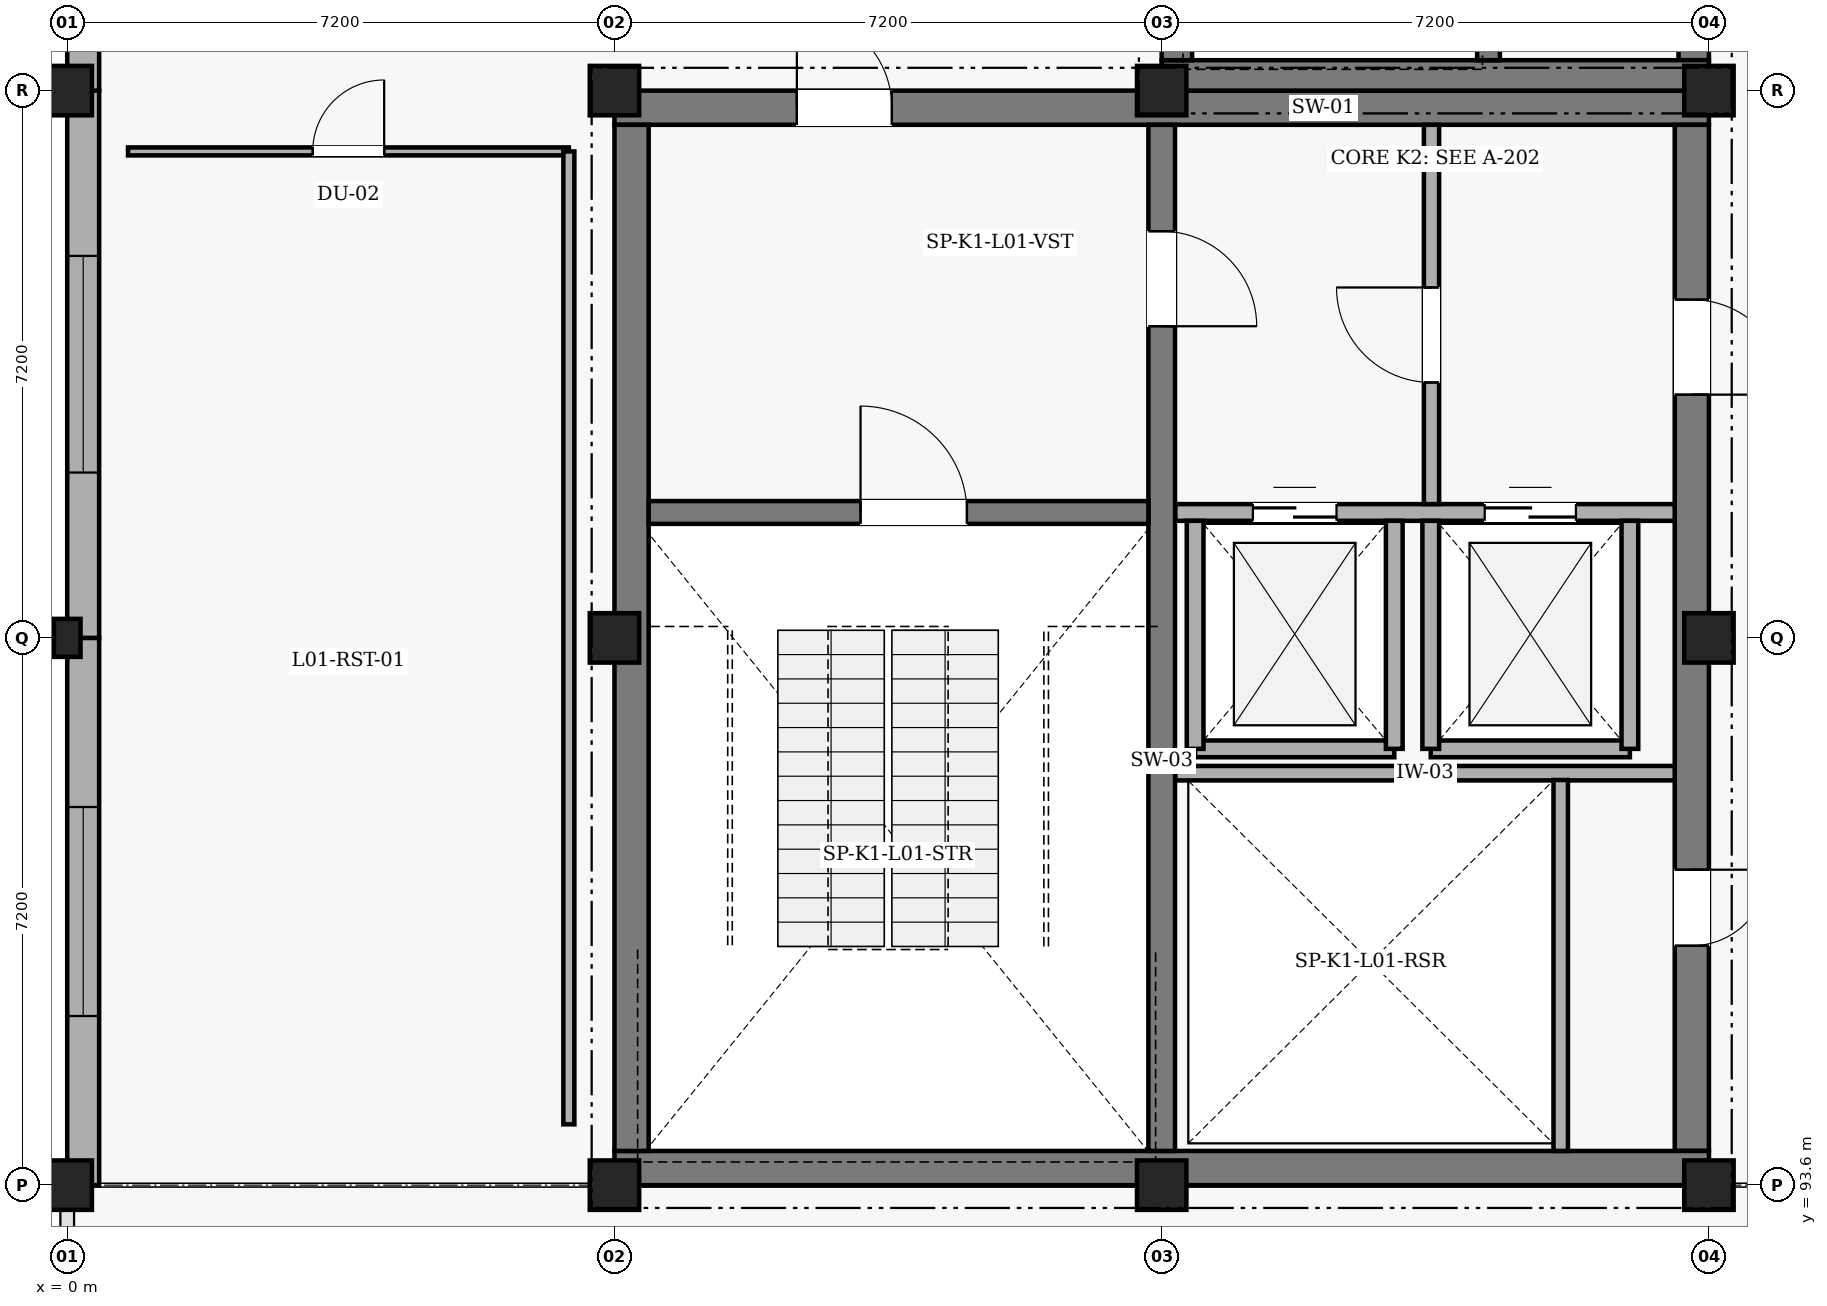
"""IFC4 building model, lengths in metres.
Left out: names, types, materials, properties, quantities, classifications, styles, units other than length and angle.
Written with IfcOpenShell. Run it as: python <this file> out.ifc"""

import sys

from ifc_helpers import new_model, si_unit, direction, frame, frame_2d, origin, origin_2d, place, context, subcontext, project, spatial, rectangle, extrude, element, fill, save


model = new_model("IFC4")
c1 = context("Model", 3, precision=1e-05, world=origin(), true_north=direction((0.0, 1.0)))
c2 = subcontext(c1, "Body", "Model", "MODEL_VIEW")
j1 = project(units=[si_unit("LENGTHUNIT", "METRE"), si_unit("PLANEANGLEUNIT", "RADIAN")], contexts=[c1])
p1 = place(None, origin())
s1 = spatial("IfcSite", under=j1, at=p1, CompositionType="ELEMENT")
p2 = place(p1, origin())
s2 = spatial("IfcBuilding", under=s1, at=p2, CompositionType="ELEMENT")
p3 = place(p2, frame((0.0, 0.0, 5.4)))
s3 = spatial("IfcBuildingStorey", under=s2, at=p3, CompositionType="ELEMENT", Elevation=5.4)
p4 = place(p3, frame((7.2, 107.775, 0.0), z_axis=(0.0, 0.0, 1.0), x_axis=(1.0, 0.0, 0.0)))
e1 = element("IfcWall", 1, at=p4, inside=s3, PredefinedType="SHEAR", context=c2, shape_type="SweptSolid", body=[
    extrude(rectangle(XDim=14.4, YDim=0.45, at=frame_2d((7.2, 0.0))), origin(), (0.0, 0.0, 1.0), 4.2),
])
p5 = place(p4, frame((2.4, 0.0, 0.0)))
e2 = element("IfcOpeningElement", 2, at=p5, cuts=e1, PredefinedType="OPENING", context=c2, shape_type="SweptSolid", body=[
    extrude(rectangle(XDim=1.25, YDim=2.2, at=frame_2d((0.625, 1.1))), frame((0.0, 0.235, 0.0), z_axis=(0.0, -1.0, 0.0), x_axis=(1.0, 0.0, 0.0)), (0.0, 0.0, 1.0), 0.47),
])
p6 = place(p3, frame((21.375, 107.55, 0.0), z_axis=(0.0, 0.0, 1.0), x_axis=(0.0, -1.0, 0.0)))
e3 = element("IfcWall", 3, at=p6, inside=s3, PredefinedType="SHEAR", context=c2, shape_type="SweptSolid", body=[
    extrude(rectangle(XDim=13.5, YDim=0.45, at=frame_2d((6.75, 0.0))), origin(), (0.0, 0.0, 1.0), 4.2),
])
p7 = place(p6, frame((9.8, 0.0, 0.0)))
e4 = element("IfcOpeningElement", 4, at=p7, cuts=e3, PredefinedType="OPENING", context=c2, shape_type="SweptSolid", body=[
    extrude(rectangle(XDim=1.0, YDim=2.15, at=frame_2d((0.5, 1.075))), frame((0.0, 0.235, 0.0), z_axis=(0.0, -1.0, 0.0), x_axis=(1.0, 0.0, 0.0)), (0.0, 0.0, 1.0), 0.47),
])
p8 = place(p6, frame((2.3, 0.0, 0.0)))
e5 = element("IfcOpeningElement", 5, at=p8, cuts=e3, PredefinedType="OPENING", context=c2, shape_type="SweptSolid", body=[
    extrude(rectangle(XDim=1.25, YDim=2.2, at=frame_2d((0.625, 1.1))), frame((0.0, 0.235, 0.0), z_axis=(0.0, -1.0, 0.0), x_axis=(1.0, 0.0, 0.0)), (0.0, 0.0, 1.0), 0.47),
])
p9 = place(p3, frame((21.6, 93.825, 0.0), z_axis=(0.0, 0.0, 1.0), x_axis=(-1.0, 0.0, 0.0)))
e6 = element("IfcWall", 6, at=p9, inside=s3, PredefinedType="SHEAR", context=c2, shape_type="SweptSolid", body=[
    extrude(rectangle(XDim=14.4, YDim=0.45, at=frame_2d((7.2, 0.0))), origin(), (0.0, 0.0, 1.0), 4.2),
])
p10 = place(p3, frame((7.425, 94.05, 0.0), z_axis=(0.0, 0.0, 1.0), x_axis=(0.0, 1.0, 0.0)))
e7 = element("IfcWall", 7, at=p10, inside=s3, PredefinedType="SHEAR", context=c2, shape_type="SweptSolid", body=[
    extrude(rectangle(XDim=13.5, YDim=0.45, at=frame_2d((6.75, 0.0))), origin(), (0.0, 0.0, 1.0), 4.2),
])
p11 = place(p3, frame((14.4, 107.55, 0.0), z_axis=(0.0, 0.0, 1.0), x_axis=(0.0, -1.0, 0.0)))
e8 = element("IfcWall", 8, at=p11, inside=s3, PredefinedType="SHEAR", context=c2, shape_type="SweptSolid", body=[
    extrude(rectangle(XDim=13.5, YDim=0.35, at=frame_2d((6.75, 0.0))), origin(), (0.0, 0.0, 1.0), 4.2),
])
p12 = place(p11, frame((1.4, 0.0, 0.0)))
e9 = element("IfcOpeningElement", 9, at=p12, cuts=e8, PredefinedType="OPENING", context=c2, shape_type="SweptSolid", body=[
    extrude(rectangle(XDim=1.25, YDim=2.2, at=frame_2d((0.625, 1.1))), frame((0.0, 0.185, 0.0), z_axis=(0.0, -1.0, 0.0), x_axis=(1.0, 0.0, 0.0)), (0.0, 0.0, 1.0), 0.37),
])
p13 = place(p3, frame((7.65, 102.45, 0.0), z_axis=(0.0, 0.0, 1.0), x_axis=(1.0, 0.0, 0.0)))
e10 = element("IfcWall", 10, at=p13, inside=s3, PredefinedType="SHEAR", context=c2, shape_type="SweptSolid", body=[
    extrude(rectangle(XDim=6.575, YDim=0.3, at=frame_2d((3.288, 0.0))), origin(), (0.0, 0.0, 1.0), 4.2),
])
p14 = place(p13, frame((2.788, 0.0, 0.0)))
e11 = element("IfcOpeningElement", 11, at=p14, cuts=e10, PredefinedType="OPENING", context=c2, shape_type="SweptSolid", body=[
    extrude(rectangle(XDim=1.4, YDim=2.2, at=frame_2d((0.7, 1.1))), frame((0.0, 0.16, 0.0), z_axis=(0.0, -1.0, 0.0), x_axis=(1.0, 0.0, 0.0)), (0.0, 0.0, 1.0), 0.32),
])
p15 = place(p3, frame((21.4, 122.0, 0.0), z_axis=(0.0, 0.0, 1.0), x_axis=(0.0, -1.0, 0.0)))
e12 = element("IfcWall", 12, at=p15, inside=s3, PredefinedType="SHEAR", context=c2, shape_type="SweptSolid", body=[
    extrude(rectangle(XDim=13.6, YDim=0.4, at=frame_2d((6.8, 0.0))), origin(), (0.0, 0.0, 1.0), 4.2),
])
p16 = place(p15, frame((2.3, 0.0, 0.0)))
e13 = element("IfcOpeningElement", 13, at=p16, cuts=e12, PredefinedType="OPENING", context=c2, shape_type="SweptSolid", body=[
    extrude(rectangle(XDim=1.25, YDim=2.2, at=frame_2d((0.625, 1.1))), frame((0.0, 0.21, 0.0), z_axis=(0.0, -1.0, 0.0), x_axis=(1.0, 0.0, 0.0)), (0.0, 0.0, 1.0), 0.42),
])
p17 = place(p3, frame((21.6, 108.2, 0.0), z_axis=(0.0, 0.0, 1.0), x_axis=(-1.0, 0.0, 0.0)))
e14 = element("IfcWall", 14, at=p17, inside=s3, PredefinedType="SHEAR", context=c2, shape_type="SweptSolid", body=[
    extrude(rectangle(XDim=7.2, YDim=0.4, at=frame_2d((3.6, 0.0))), origin(), (0.0, 0.0, 1.0), 4.2),
])
p18 = place(p3, frame((14.6, 108.4, 0.0), z_axis=(0.0, 0.0, 1.0), x_axis=(0.0, 1.0, 0.0)))
e15 = element("IfcWall", 15, at=p18, inside=s3, PredefinedType="SHEAR", context=c2, shape_type="SweptSolid", body=[
    extrude(rectangle(XDim=13.6, YDim=0.4, at=frame_2d((6.8, 0.0))), origin(), (0.0, 0.0, 1.0), 4.2),
])
p19 = place(p18, frame((9.8, 0.0, 0.0)))
e16 = element("IfcOpeningElement", 16, at=p19, cuts=e15, PredefinedType="OPENING", context=c2, shape_type="SweptSolid", body=[
    extrude(rectangle(XDim=1.25, YDim=2.2, at=frame_2d((0.625, 1.1))), frame((0.0, 0.21, 0.0), z_axis=(0.0, -1.0, 0.0), x_axis=(1.0, 0.0, 0.0)), (0.0, 0.0, 1.0), 0.42),
])
p20 = place(p3, frame((18.7, 116.7, 0.0), z_axis=(0.0, 0.0, 1.0), x_axis=(0.0, -1.0, 0.0)))
e17 = element("IfcWall", 17, at=p20, inside=s3, PredefinedType="SHEAR", context=c2, shape_type="SweptSolid", body=[
    extrude(rectangle(XDim=8.3, YDim=0.3, at=frame_2d((4.15, 0.0))), origin(), (0.0, 0.0, 1.0), 4.2),
])
p21 = place(p3, frame((0.0, 93.6, 0.0), z_axis=(0.0, 0.0, 1.0), x_axis=(0.0, 1.0, 0.0)))
e18 = element("IfcColumn", 18, at=p21, inside=s3, PredefinedType="COLUMN", context=c2, shape_type="SweptSolid", body=[
    extrude(rectangle(XDim=0.65, YDim=0.65, at=origin_2d()), origin(), (0.0, 0.0, 1.0), 3.88),
])
p22 = place(p3, frame((0.0, 100.8, 0.0), z_axis=(0.0, 0.0, 1.0), x_axis=(1.0, 0.0, 0.0)))
e19 = element("IfcColumn", 19, at=p22, inside=s3, PredefinedType="PILASTER", context=c2, shape_type="SweptSolid", body=[
    extrude(rectangle(XDim=0.35, YDim=0.5, at=origin_2d()), origin(), (0.0, 0.0, 1.0), 3.88),
])
for number, where, z_axis, x_axis in (
    (20, (0.0, 108.0, 0.0), (0.0, 0.0, 1.0), (1.0, 0.0, 0.0)),
    (21, (7.2, 93.6, 0.0), (0.0, 0.0, 1.0), (1.0, 0.0, 0.0)),
    (22, (7.2, 100.8, 0.0), (0.0, 0.0, 1.0), (1.0, 0.0, 0.0)),
    (23, (7.2, 108.0, 0.0), (0.0, 0.0, 1.0), (1.0, 0.0, 0.0)),
    (24, (14.4, 93.6, 0.0), (0.0, 0.0, 1.0), (1.0, 0.0, 0.0)),
    (25, (14.4, 108.0, 0.0), (0.0, 0.0, 1.0), (1.0, 0.0, 0.0)),
    (26, (21.6, 93.6, 0.0), (0.0, 0.0, 1.0), (1.0, 0.0, 0.0)),
    (27, (21.6, 100.8, 0.0), (0.0, 0.0, 1.0), (1.0, 0.0, 0.0)),
    (28, (21.6, 108.0, 0.0), (0.0, 0.0, 1.0), (1.0, 0.0, 0.0)),
):
    element("IfcColumn", number, at=place(p3, frame(where, z_axis=z_axis, x_axis=x_axis)), inside=s3, PredefinedType="COLUMN", context=c2, shape_type="SweptSolid", body=[
        extrude(rectangle(XDim=0.65, YDim=0.65, at=origin_2d()), origin(), (0.0, 0.0, 1.0), 3.88),
    ])
p23 = place(p3, frame((0.21, 93.6, 0.0), z_axis=(0.0, 0.0, 1.0), x_axis=(0.0, 1.0, 0.0)))
e29 = element("IfcWall", 29, at=p23, inside=s3, PredefinedType="SOLIDWALL", context=c2, shape_type="SweptSolid", body=[
    extrude(rectangle(XDim=7.2, YDim=0.42, at=frame_2d((3.6, 0.0))), origin(), (0.0, 0.0, 1.0), 3.55),
])
p24 = place(p23, frame((2.225, 0.0, 0.9)))
e30 = element("IfcOpeningElement", 30, at=p24, cuts=e29, PredefinedType="OPENING", context=c2, shape_type="SweptSolid", body=[
    extrude(rectangle(XDim=2.75, YDim=1.75, at=frame_2d((1.375, 0.875))), frame((0.0, 0.22, 0.0), z_axis=(0.0, -1.0, 0.0), x_axis=(1.0, 0.0, 0.0)), (0.0, 0.0, 1.0), 0.44),
])
p25 = place(p3, frame((0.21, 100.8, 0.0), z_axis=(0.0, 0.0, 1.0), x_axis=(0.0, 1.0, 0.0)))
e31 = element("IfcWall", 31, at=p25, inside=s3, PredefinedType="SOLIDWALL", context=c2, shape_type="SweptSolid", body=[
    extrude(rectangle(XDim=7.2, YDim=0.42, at=frame_2d((3.6, 0.0))), origin(), (0.0, 0.0, 1.0), 3.55),
])
p26 = place(p25, frame((2.175, 0.0, 0.9)))
e32 = element("IfcOpeningElement", 32, at=p26, cuts=e31, PredefinedType="OPENING", context=c2, shape_type="SweptSolid", body=[
    extrude(rectangle(XDim=2.85, YDim=1.55, at=frame_2d((1.425, 0.775))), frame((0.0, 0.22, 0.0), z_axis=(0.0, -1.0, 0.0), x_axis=(1.0, 0.0, 0.0)), (0.0, 0.0, 1.0), 0.44),
])
p27 = place(p3, frame((0.21, 108.0, 0.0), z_axis=(0.0, 0.0, 1.0), x_axis=(0.0, 1.0, 0.0)))
e33 = element("IfcWall", 33, at=p27, inside=s3, PredefinedType="SOLIDWALL", context=c2, shape_type="SweptSolid", body=[
    extrude(rectangle(XDim=7.2, YDim=0.42, at=frame_2d((3.6, 0.0))), origin(), (0.0, 0.0, 1.0), 3.55),
])
p28 = place(p27, frame((2.125, 0.0, 0.9)))
e34 = element("IfcOpeningElement", 34, at=p28, cuts=e33, PredefinedType="OPENING", context=c2, shape_type="SweptSolid", body=[
    extrude(rectangle(XDim=2.95, YDim=1.6, at=frame_2d((1.475, 0.8))), frame((0.0, 0.22, 0.0), z_axis=(0.0, -1.0, 0.0), x_axis=(1.0, 0.0, 0.0)), (0.0, 0.0, 1.0), 0.44),
])
p29 = place(p3, frame((14.58, 99.02, 0.0), z_axis=(0.0, 0.0, 1.0), x_axis=(1.0, 0.0, 0.0)))
e35 = element("IfcWall", 35, at=p29, inside=s3, PredefinedType="PARTITIONING", context=c2, shape_type="SweptSolid", body=[
    extrude(rectangle(XDim=6.57, YDim=0.19, at=frame_2d((3.285, 0.0))), origin(), (0.0, 0.0, 1.0), 3.85),
])
p30 = place(p3, frame((19.65, 94.05, 0.0), z_axis=(0.0, 0.0, 1.0), x_axis=(0.0, 1.0, 0.0)))
e36 = element("IfcWall", 36, at=p30, inside=s3, PredefinedType="PARTITIONING", context=c2, shape_type="SweptSolid", body=[
    extrude(rectangle(XDim=4.88, YDim=0.19, at=frame_2d((2.44, 0.0))), origin(), (0.0, 0.0, 1.0), 3.85),
])
p31 = place(p3, frame((14.58, 102.45, 0.0), z_axis=(0.0, 0.0, 1.0), x_axis=(1.0, 0.0, 0.0)))
e37 = element("IfcWall", 37, at=p31, inside=s3, PredefinedType="PARTITIONING", context=c2, shape_type="SweptSolid", body=[
    extrude(rectangle(XDim=6.57, YDim=0.22, at=frame_2d((3.285, 0.0))), origin(), (0.0, 0.0, 1.0), 3.85),
])
p32 = place(p31, frame((1.02, 0.0, 0.0)))
e38 = element("IfcOpeningElement", 38, at=p32, cuts=e37, PredefinedType="OPENING", context=c2, shape_type="SweptSolid", body=[
    extrude(rectangle(XDim=1.1, YDim=2.15, at=frame_2d((0.55, 1.075))), frame((0.0, 0.12, 0.0), z_axis=(0.0, -1.0, 0.0), x_axis=(1.0, 0.0, 0.0)), (0.0, 0.0, 1.0), 0.24),
])
p33 = place(p31, frame((4.07, 0.0, 0.0)))
e39 = element("IfcOpeningElement", 39, at=p33, cuts=e37, PredefinedType="OPENING", context=c2, shape_type="SweptSolid", body=[
    extrude(rectangle(XDim=1.2, YDim=2.15, at=frame_2d((0.6, 1.075))), frame((0.0, 0.12, 0.0), z_axis=(0.0, -1.0, 0.0), x_axis=(1.0, 0.0, 0.0)), (0.0, 0.0, 1.0), 0.24),
])
p34 = place(p3, frame((14.84, 99.34, 0.0), z_axis=(0.0, 0.0, 1.0), x_axis=(1.0, 0.0, 0.0)))
e40 = element("IfcWall", 40, at=p34, inside=s3, PredefinedType="PARTITIONING", context=c2, shape_type="SweptSolid", body=[
    extrude(rectangle(XDim=2.62, YDim=0.22, at=frame_2d((1.31, 0.0))), origin(), (0.0, 0.0, 1.0), 3.85),
])
for number, where, z_axis, x_axis in (
    (41, (14.84, 99.34, 0.0), (0.0, 0.0, 1.0), (0.0, 1.0, 0.0)),
    (42, (17.46, 99.34, 0.0), (0.0, 0.0, 1.0), (0.0, 1.0, 0.0)),
):
    element("IfcWall", number, at=place(p3, frame(where, z_axis=z_axis, x_axis=x_axis)), inside=s3, PredefinedType="PARTITIONING", context=c2, shape_type="SweptSolid", body=[
        extrude(rectangle(XDim=3.0, YDim=0.22, at=frame_2d((1.5, 0.0))), origin(), (0.0, 0.0, 1.0), 3.85),
    ])
p35 = place(p3, frame((17.94, 99.34, 0.0), z_axis=(0.0, 0.0, 1.0), x_axis=(1.0, 0.0, 0.0)))
e43 = element("IfcWall", 43, at=p35, inside=s3, PredefinedType="PARTITIONING", context=c2, shape_type="SweptSolid", body=[
    extrude(rectangle(XDim=2.62, YDim=0.22, at=frame_2d((1.31, 0.0))), origin(), (0.0, 0.0, 1.0), 3.85),
])
for number, where, z_axis, x_axis in (
    (44, (17.94, 99.34, 0.0), (0.0, 0.0, 1.0), (0.0, 1.0, 0.0)),
    (45, (20.56, 99.34, 0.0), (0.0, 0.0, 1.0), (0.0, 1.0, 0.0)),
):
    element("IfcWall", number, at=place(p3, frame(where, z_axis=z_axis, x_axis=x_axis)), inside=s3, PredefinedType="PARTITIONING", context=c2, shape_type="SweptSolid", body=[
        extrude(rectangle(XDim=3.0, YDim=0.22, at=frame_2d((1.5, 0.0))), origin(), (0.0, 0.0, 1.0), 3.85),
    ])
p36 = place(p3, frame((17.95, 102.56, 0.0), z_axis=(0.0, 0.0, 1.0), x_axis=(0.0, 1.0, 0.0)))
e46 = element("IfcWall", 46, at=p36, inside=s3, PredefinedType="PARTITIONING", context=c2, shape_type="SweptSolid", body=[
    extrude(rectangle(XDim=4.99, YDim=0.2, at=frame_2d((2.495, 0.0))), origin(), (0.0, 0.0, 1.0), 3.85),
])
p37 = place(p36, frame((1.6, 0.0, 0.0)))
e47 = element("IfcOpeningElement", 47, at=p37, cuts=e46, PredefinedType="OPENING", context=c2, shape_type="SweptSolid", body=[
    extrude(rectangle(XDim=1.25, YDim=2.2, at=frame_2d((0.625, 1.1))), frame((0.0, 0.11, 0.0), z_axis=(0.0, -1.0, 0.0), x_axis=(1.0, 0.0, 0.0)), (0.0, 0.0, 1.0), 0.22),
])
p38 = place(p3, frame((0.8, 107.2, 0.0), z_axis=(0.0, 0.0, 1.0), x_axis=(1.0, 0.0, 0.0)))
e48 = element("IfcWall", 48, at=p38, inside=s3, PredefinedType="PARTITIONING", context=c2, shape_type="SweptSolid", body=[
    extrude(rectangle(XDim=5.8, YDim=0.105, at=frame_2d((2.9, 0.0))), origin(), (0.0, 0.0, 1.0), 3.85),
])
p39 = place(p38, frame((2.43, 0.0, 0.0)))
e49 = element("IfcOpeningElement", 49, at=p39, cuts=e48, PredefinedType="OPENING", context=c2, shape_type="SweptSolid", body=[
    extrude(rectangle(XDim=0.94, YDim=2.08, at=frame_2d((0.47, 1.04))), frame((0.0, 0.062, 0.0), z_axis=(0.0, -1.0, 0.0), x_axis=(1.0, 0.0, 0.0)), (0.0, 0.0, 1.0), 0.125),
])
p40 = place(p3, frame((6.6, 107.2, 0.0), z_axis=(0.0, 0.0, 1.0), x_axis=(0.0, -1.0, 0.0)))
e50 = element("IfcWall", 50, at=p40, inside=s3, PredefinedType="PARTITIONING", context=c2, shape_type="SweptSolid", body=[
    extrude(rectangle(XDim=12.8, YDim=0.145, at=frame_2d((6.4, 0.0))), origin(), (0.0, 0.0, 1.0), 3.43),
])
p41 = place(p24, origin())
e51 = element("IfcWindow", 51, at=p41, inside=s3, PartitioningType="SINGLE_PANEL", PredefinedType="WINDOW", context=c2, shape_type="SweptSolid", body=[
    extrude(rectangle(XDim=2.75, YDim=1.75, at=frame_2d((1.375, 0.875))), frame((0.0, 0.03, 0.0), z_axis=(0.0, -1.0, 0.0), x_axis=(1.0, 0.0, 0.0)), (0.0, 0.0, 1.0), 0.06),
])
fill(e30, e51)
p42 = place(p26, origin())
e52 = element("IfcWindow", 52, at=p42, inside=s3, PartitioningType="SINGLE_PANEL", PredefinedType="WINDOW", context=c2, shape_type="SweptSolid", body=[
    extrude(rectangle(XDim=2.85, YDim=1.55, at=frame_2d((1.425, 0.775))), frame((0.0, 0.03, 0.0), z_axis=(0.0, -1.0, 0.0), x_axis=(1.0, 0.0, 0.0)), (0.0, 0.0, 1.0), 0.06),
])
fill(e32, e52)
p43 = place(p14, origin())
e53 = element("IfcDoor", 53, at=p43, inside=s3, OperationType="SINGLE_SWING_LEFT", PredefinedType="DOOR", context=c2, shape_type="SweptSolid", body=[
    extrude(rectangle(XDim=1.4, YDim=2.2, at=frame_2d((0.7, 1.1))), frame((0.0, 0.025, 0.0), z_axis=(0.0, -1.0, 0.0), x_axis=(1.0, 0.0, 0.0)), (0.0, 0.0, 1.0), 0.05),
])
fill(e11, e53)
p44 = place(p12, origin())
e54 = element("IfcDoor", 54, at=p44, inside=s3, OperationType="SINGLE_SWING_RIGHT", PredefinedType="DOOR", context=c2, shape_type="SweptSolid", body=[
    extrude(rectangle(XDim=1.25, YDim=2.2, at=frame_2d((0.625, 1.1))), frame((0.0, 0.025, 0.0), z_axis=(0.0, -1.0, 0.0), x_axis=(1.0, 0.0, 0.0)), (0.0, 0.0, 1.0), 0.05),
])
fill(e9, e54)
p45 = place(p7, origin())
e55 = element("IfcDoor", 55, at=p45, inside=s3, OperationType="SINGLE_SWING_LEFT", PredefinedType="DOOR", context=c2, shape_type="SweptSolid", body=[
    extrude(rectangle(XDim=1.0, YDim=2.15, at=frame_2d((0.5, 1.075))), frame((0.0, 0.025, 0.0), z_axis=(0.0, -1.0, 0.0), x_axis=(1.0, 0.0, 0.0)), (0.0, 0.0, 1.0), 0.05),
])
fill(e4, e55)
p46 = place(p32, origin())
e56 = element("IfcDoor", 56, at=p46, inside=s3, OperationType="DOUBLE_DOOR_SLIDING", PredefinedType="DOOR", context=c2, shape_type="SweptSolid", body=[
    extrude(rectangle(XDim=1.1, YDim=2.15, at=frame_2d((0.55, 1.075))), frame((0.0, 0.025, 0.0), z_axis=(0.0, -1.0, 0.0), x_axis=(1.0, 0.0, 0.0)), (0.0, 0.0, 1.0), 0.05),
])
fill(e38, e56)
p47 = place(p33, origin())
e57 = element("IfcDoor", 57, at=p47, inside=s3, OperationType="DOUBLE_DOOR_SLIDING", PredefinedType="DOOR", context=c2, shape_type="SweptSolid", body=[
    extrude(rectangle(XDim=1.2, YDim=2.15, at=frame_2d((0.6, 1.075))), frame((0.0, 0.025, 0.0), z_axis=(0.0, -1.0, 0.0), x_axis=(1.0, 0.0, 0.0)), (0.0, 0.0, 1.0), 0.05),
])
fill(e39, e57)
p48 = place(p37, origin())
e58 = element("IfcDoor", 58, at=p48, inside=s3, OperationType="SINGLE_SWING_RIGHT", PredefinedType="DOOR", context=c2, shape_type="SweptSolid", body=[
    extrude(rectangle(XDim=1.25, YDim=2.2, at=frame_2d((0.625, 1.1))), frame((0.0, 0.025, 0.0), z_axis=(0.0, -1.0, 0.0), x_axis=(1.0, 0.0, 0.0)), (0.0, 0.0, 1.0), 0.05),
])
fill(e47, e58)
p49 = place(p5, origin())
e59 = element("IfcDoor", 59, at=p49, inside=s3, OperationType="SINGLE_SWING_LEFT", PredefinedType="DOOR", context=c2, shape_type="SweptSolid", body=[
    extrude(rectangle(XDim=1.25, YDim=2.2, at=frame_2d((0.625, 1.1))), frame((0.0, 0.025, 0.0), z_axis=(0.0, -1.0, 0.0), x_axis=(1.0, 0.0, 0.0)), (0.0, 0.0, 1.0), 0.05),
])
fill(e2, e59)
p50 = place(p8, origin())
e60 = element("IfcDoor", 60, at=p50, inside=s3, OperationType="SINGLE_SWING_RIGHT", PredefinedType="DOOR", context=c2, shape_type="SweptSolid", body=[
    extrude(rectangle(XDim=1.25, YDim=2.2, at=frame_2d((0.625, 1.1))), frame((0.0, 0.025, 0.0), z_axis=(0.0, -1.0, 0.0), x_axis=(1.0, 0.0, 0.0)), (0.0, 0.0, 1.0), 0.05),
])
fill(e5, e60)
p51 = place(p39, origin())
e61 = element("IfcDoor", 61, at=p51, inside=s3, OperationType="SINGLE_SWING_RIGHT", PredefinedType="DOOR", context=c2, shape_type="SweptSolid", body=[
    extrude(rectangle(XDim=0.94, YDim=2.08, at=frame_2d((0.47, 1.04))), frame((0.0, 0.025, 0.0), z_axis=(0.0, -1.0, 0.0), x_axis=(1.0, 0.0, 0.0)), (0.0, 0.0, 1.0), 0.05),
])
fill(e49, e61)
save(model, sys.argv[1])
